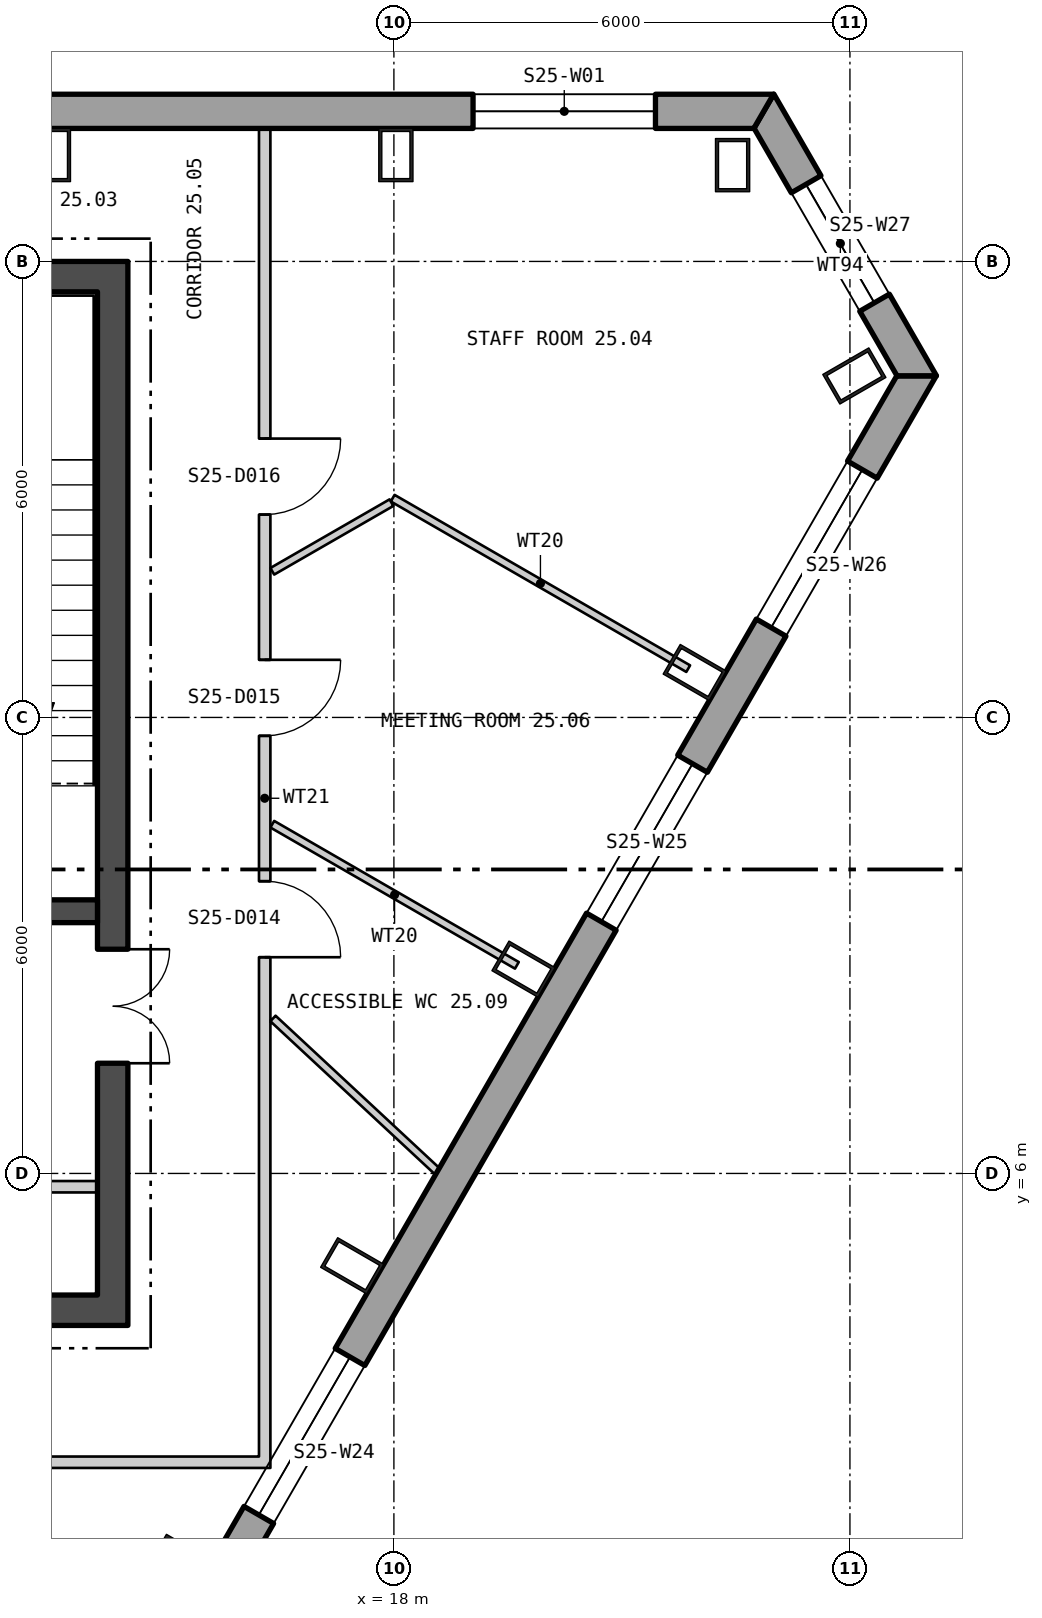
"""IFC4 building model, lengths in metres.
Left out: names, types, materials, properties, quantities, classifications, styles, units other than length and angle.
Written with IfcOpenShell. Run it as: python <this file> out.ifc"""

import sys

from ifc_helpers import new_model, si_unit, direction, frame, frame_2d, origin, origin_2d, place, context, subcontext, project, spatial, polyline, rectangle, hollow_rectangle, outline, extrude, element, fill, save


model = new_model("IFC4")
c1 = context("Model", 3, precision=1e-05, world=origin(), true_north=direction((0.0, 1.0)))
c2 = subcontext(c1, "Body", "Model", "MODEL_VIEW")
j1 = project(units=[si_unit("LENGTHUNIT", "METRE"), si_unit("PLANEANGLEUNIT", "RADIAN")], contexts=[c1])
p1 = place(None, origin())
s1 = spatial("IfcSite", under=j1, at=p1, CompositionType="ELEMENT")
p2 = place(p1, origin())
s2 = spatial("IfcBuilding", under=s1, at=p2, CompositionType="ELEMENT")
p3 = place(p2, frame((0.0, 0.0, 321.0)))
s3 = spatial("IfcBuildingStorey", under=s2, at=p3, CompositionType="ELEMENT", Elevation=321.0)
for number, where, z_axis, x_axis in (
    (1, (22.456, 19.267, 0.0), (0.0, 0.0, 1.0), (-1.0, 0.0, 0.0)),
    (2, (18.026, 19.4, 0.0), (0.0, 0.0, 1.0), (-1.0, 0.0, 0.0)),
    (3, (13.52, 19.4, 0.0), (0.0, 0.0, 1.0), (-1.0, 0.0, 0.0)),
    (4, (15.198, 0.882, 0.0), (0.0, 0.0, 1.0), (0.5, 0.866, 0.0)),
    (5, (17.451, 4.785, 0.0), (0.0, 0.0, 1.0), (0.5, 0.866, 0.0)),
    (6, (19.705, 8.688, 0.0), (0.0, 0.0, 1.0), (0.5, 0.866, 0.0)),
    (7, (21.958, 12.591, 0.0), (0.0, 0.0, 1.0), (0.5, 0.866, 0.0)),
    (8, (24.058, 16.493, 0.0), (0.0, 0.0, 1.0), (-0.5, 0.866, 0.0)),
):
    element("IfcColumn", number, at=place(p3, frame(where, z_axis=z_axis, x_axis=x_axis)), inside=s3, PredefinedType="COLUMN", context=c2, shape_type="SweptSolid", body=[
        extrude(hollow_rectangle(XDim=0.45, YDim=0.7, WallThickness=0.04, at=origin_2d()), origin(), (0.0, 0.0, 1.0), 4.2),
    ])
p4 = place(p3, frame((22.865, 19.975, -0.4), z_axis=(0.0, 0.0, 1.0), x_axis=(-1.0, 0.0, 0.0)))
e9 = element("IfcWall", 9, at=p4, inside=s3, PredefinedType="SOLIDWALL", context=c2, shape_type="SweptSolid", body=[
    extrude(outline(polyline([(-0.13, -0.225), (45.86, -0.225), (45.6, 0.225), (0.13, 0.225), (-0.13, -0.225)])), origin(), (0.0, 0.0, 1.0), 4.2),
])
p5 = place(p4, frame((1.424, 0.0, 1.3)))
e10 = element("IfcOpeningElement", 10, at=p5, cuts=e9, PredefinedType="OPENING", context=c2, shape_type="SweptSolid", body=[
    extrude(rectangle(XDim=2.4, YDim=2.3, at=frame_2d((1.2, 1.15))), frame((0.0, 0.235, 0.0), z_axis=(0.0, -1.0, 0.0), x_axis=(1.0, 0.0, 0.0)), (0.0, 0.0, 1.0), 0.47),
])
p6 = place(p4, frame((14.905, 0.0, 1.3)))
e11 = element("IfcOpeningElement", 11, at=p6, cuts=e9, PredefinedType="OPENING", context=c2, shape_type="SweptSolid", body=[
    extrude(rectangle(XDim=2.4, YDim=2.3, at=frame_2d((1.2, 1.15))), frame((0.0, 0.235, 0.0), z_axis=(0.0, -1.0, 0.0), x_axis=(1.0, 0.0, 0.0)), (0.0, 0.0, 1.0), 0.47),
])
p7 = place(p4, frame((19.412, 0.0, 1.3)))
e12 = element("IfcOpeningElement", 12, at=p7, cuts=e9, PredefinedType="OPENING", context=c2, shape_type="SweptSolid", body=[
    extrude(rectangle(XDim=2.4, YDim=2.3, at=frame_2d((1.2, 1.15))), frame((0.0, 0.235, 0.0), z_axis=(0.0, -1.0, 0.0), x_axis=(1.0, 0.0, 0.0)), (0.0, 0.0, 1.0), 0.47),
])
p8 = place(p4, frame((23.918, 0.0, 1.3)))
e13 = element("IfcOpeningElement", 13, at=p8, cuts=e9, PredefinedType="OPENING", context=c2, shape_type="SweptSolid", body=[
    extrude(rectangle(XDim=2.4, YDim=2.3, at=frame_2d((1.2, 1.15))), frame((0.0, 0.235, 0.0), z_axis=(0.0, -1.0, 0.0), x_axis=(1.0, 0.0, 0.0)), (0.0, 0.0, 1.0), 0.47),
])
p9 = place(p4, frame((28.425, 0.0, 1.3)))
e14 = element("IfcOpeningElement", 14, at=p9, cuts=e9, PredefinedType="OPENING", context=c2, shape_type="SweptSolid", body=[
    extrude(rectangle(XDim=2.4, YDim=2.3, at=frame_2d((1.2, 1.15))), frame((0.0, 0.235, 0.0), z_axis=(0.0, -1.0, 0.0), x_axis=(1.0, 0.0, 0.0)), (0.0, 0.0, 1.0), 0.47),
])
p10 = place(p4, frame((32.932, 0.0, 1.3)))
e15 = element("IfcOpeningElement", 15, at=p10, cuts=e9, PredefinedType="OPENING", context=c2, shape_type="SweptSolid", body=[
    extrude(rectangle(XDim=2.4, YDim=2.3, at=frame_2d((1.2, 1.15))), frame((0.0, 0.235, 0.0), z_axis=(0.0, -1.0, 0.0), x_axis=(1.0, 0.0, 0.0)), (0.0, 0.0, 1.0), 0.47),
])
p11 = place(p4, frame((41.907, 0.0, 1.3)))
e16 = element("IfcOpeningElement", 16, at=p11, cuts=e9, PredefinedType="OPENING", context=c2, shape_type="SweptSolid", body=[
    extrude(rectangle(XDim=2.4, YDim=2.3, at=frame_2d((1.2, 1.15))), frame((0.0, 0.235, 0.0), z_axis=(0.0, -1.0, 0.0), x_axis=(1.0, 0.0, 0.0)), (0.0, 0.0, 1.0), 0.47),
])
p12 = place(p3, frame((2.01, -23.11, -0.18), z_axis=(0.0, 0.0, 1.0), x_axis=(0.500000141277, 0.866025322218, 0.0)))
e17 = element("IfcWall", 17, at=p12, inside=s3, PredefinedType="SOLIDWALL", context=c2, shape_type="SweptSolid", body=[
    extrude(outline(polyline([(-0.13, -0.225), (45.86, -0.225), (45.6, 0.225), (0.13, 0.225), (-0.13, -0.225)])), origin(), (0.0, 0.0, 1.0), 3.98),
])
p13 = place(p12, frame((1.424, 0.0, 1.08)))
e18 = element("IfcOpeningElement", 18, at=p13, cuts=e17, PredefinedType="OPENING", context=c2, shape_type="SweptSolid", body=[
    extrude(rectangle(XDim=2.4, YDim=2.3, at=frame_2d((1.2, 1.15))), frame((0.0, 0.235, 0.0), z_axis=(0.0, -1.0, 0.0), x_axis=(1.0, 0.0, 0.0)), (0.0, 0.0, 1.0), 0.47),
])
p14 = place(p12, frame((5.892, 0.0, 1.08)))
e19 = element("IfcOpeningElement", 19, at=p14, cuts=e17, PredefinedType="OPENING", context=c2, shape_type="SweptSolid", body=[
    extrude(rectangle(XDim=2.4, YDim=2.3, at=frame_2d((1.2, 1.15))), frame((0.0, 0.235, 0.0), z_axis=(0.0, -1.0, 0.0), x_axis=(1.0, 0.0, 0.0)), (0.0, 0.0, 1.0), 0.47),
])
p15 = place(p12, frame((14.905, 0.0, 1.08)))
e20 = element("IfcOpeningElement", 20, at=p15, cuts=e17, PredefinedType="OPENING", context=c2, shape_type="SweptSolid", body=[
    extrude(rectangle(XDim=2.4, YDim=2.3, at=frame_2d((1.2, 1.15))), frame((0.0, 0.235, 0.0), z_axis=(0.0, -1.0, 0.0), x_axis=(1.0, 0.0, 0.0)), (0.0, 0.0, 1.0), 0.47),
])
p16 = place(p12, frame((19.412, 0.0, 1.08)))
e21 = element("IfcOpeningElement", 21, at=p16, cuts=e17, PredefinedType="OPENING", context=c2, shape_type="SweptSolid", body=[
    extrude(rectangle(XDim=2.4, YDim=2.3, at=frame_2d((1.2, 1.15))), frame((0.0, 0.235, 0.0), z_axis=(0.0, -1.0, 0.0), x_axis=(1.0, 0.0, 0.0)), (0.0, 0.0, 1.0), 0.47),
])
p17 = place(p12, frame((23.918, 0.0, 1.08)))
e22 = element("IfcOpeningElement", 22, at=p17, cuts=e17, PredefinedType="OPENING", context=c2, shape_type="SweptSolid", body=[
    extrude(rectangle(XDim=2.4, YDim=2.3, at=frame_2d((1.2, 1.15))), frame((0.0, 0.235, 0.0), z_axis=(0.0, -1.0, 0.0), x_axis=(1.0, 0.0, 0.0)), (0.0, 0.0, 1.0), 0.47),
])
p18 = place(p12, frame((28.425, 0.0, 1.08)))
e23 = element("IfcOpeningElement", 23, at=p18, cuts=e17, PredefinedType="OPENING", context=c2, shape_type="SweptSolid", body=[
    extrude(rectangle(XDim=2.4, YDim=2.3, at=frame_2d((1.2, 1.15))), frame((0.0, 0.235, 0.0), z_axis=(0.0, -1.0, 0.0), x_axis=(1.0, 0.0, 0.0)), (0.0, 0.0, 1.0), 0.47),
])
p19 = place(p12, frame((37.438, 0.0, 1.08)))
e24 = element("IfcOpeningElement", 24, at=p19, cuts=e17, PredefinedType="OPENING", context=c2, shape_type="SweptSolid", body=[
    extrude(rectangle(XDim=2.4, YDim=2.3, at=frame_2d((1.2, 1.15))), frame((0.0, 0.235, 0.0), z_axis=(0.0, -1.0, 0.0), x_axis=(1.0, 0.0, 0.0)), (0.0, 0.0, 1.0), 0.47),
])
p20 = place(p12, frame((41.907, 0.0, 1.08)))
e25 = element("IfcOpeningElement", 25, at=p20, cuts=e17, PredefinedType="OPENING", context=c2, shape_type="SweptSolid", body=[
    extrude(rectangle(XDim=2.4, YDim=2.3, at=frame_2d((1.2, 1.15))), frame((0.0, 0.235, 0.0), z_axis=(0.0, -1.0, 0.0), x_axis=(1.0, 0.0, 0.0)), (0.0, 0.0, 1.0), 0.47),
])
p21 = place(p3, frame((24.879, 16.496, -0.4), z_axis=(0.0, 0.0, 1.0), x_axis=(-0.499999496815, 0.866025694299, 0.0)))
e26 = element("IfcWall", 26, at=p21, inside=s3, PredefinedType="SOLIDWALL", context=c2, shape_type="SweptSolid", body=[
    extrude(outline(polyline([(-0.13, -0.225), (4.15, -0.225), (3.89, 0.225), (0.13, 0.225), (-0.13, -0.225)])), origin(), (0.0, 0.0, 1.0), 4.2),
])
p22 = place(p21, frame((1.11, 0.0, 1.3)))
e27 = element("IfcOpeningElement", 27, at=p22, cuts=e26, PredefinedType="OPENING", context=c2, shape_type="SweptSolid", body=[
    extrude(rectangle(XDim=1.8, YDim=2.3, at=frame_2d((0.9, 1.15))), frame((0.0, 0.235, 0.0), z_axis=(0.0, -1.0, 0.0), x_axis=(1.0, 0.0, 0.0)), (0.0, 0.0, 1.0), 0.47),
])
p23 = place(p3, frame((-14.5, 4.2, 0.0), z_axis=(0.0, 0.0, 1.0), x_axis=(1.0, 0.0, 0.0)))
e28 = element("IfcWall", 28, at=p23, inside=s3, PredefinedType="SHEAR", context=c2, shape_type="SweptSolid", body=[
    extrude(rectangle(XDim=29.0, YDim=0.4, at=frame_2d((14.5, 0.0))), origin(), (0.0, 0.0, 1.0), 4.0),
])
p24 = place(p23, frame((9.0, 0.0, 0.0)))
e29 = element("IfcOpeningElement", 29, at=p24, cuts=e28, PredefinedType="OPENING", context=c2, shape_type="SweptSolid", body=[
    extrude(rectangle(XDim=1.8, YDim=2.4, at=frame_2d((0.9, 1.2))), frame((0.0, 0.21, 0.0), z_axis=(0.0, -1.0, 0.0), x_axis=(1.0, 0.0, 0.0)), (0.0, 0.0, 1.0), 0.42),
])
p25 = place(p23, frame((19.0, 0.0, 0.0)))
e30 = element("IfcOpeningElement", 30, at=p25, cuts=e28, PredefinedType="OPENING", context=c2, shape_type="SweptSolid", body=[
    extrude(rectangle(XDim=1.8, YDim=2.4, at=frame_2d((0.9, 1.2))), frame((0.0, 0.21, 0.0), z_axis=(0.0, -1.0, 0.0), x_axis=(1.0, 0.0, 0.0)), (0.0, 0.0, 1.0), 0.42),
])
p26 = place(p3, frame((-14.5, 17.8, 0.0), z_axis=(0.0, 0.0, 1.0), x_axis=(1.0, 0.0, 0.0)))
e31 = element("IfcWall", 31, at=p26, inside=s3, PredefinedType="SHEAR", context=c2, shape_type="SweptSolid", body=[
    extrude(rectangle(XDim=29.0, YDim=0.4, at=frame_2d((14.5, 0.0))), origin(), (0.0, 0.0, 1.0), 4.0),
])
p27 = place(p3, frame((14.3, 4.4, 0.0), z_axis=(0.0, 0.0, 1.0), x_axis=(0.0, 1.0, 0.0)))
e32 = element("IfcWall", 32, at=p27, inside=s3, PredefinedType="SHEAR", context=c2, shape_type="SweptSolid", body=[
    extrude(rectangle(XDim=13.2, YDim=0.4, at=frame_2d((6.6, 0.0))), origin(), (0.0, 0.0, 1.0), 4.0),
])
p28 = place(p27, frame((3.05, 0.0, 0.0)))
e33 = element("IfcOpeningElement", 33, at=p28, cuts=e32, PredefinedType="OPENING", context=c2, shape_type="SweptSolid", body=[
    extrude(rectangle(XDim=1.5, YDim=2.1, at=frame_2d((0.75, 1.05))), frame((0.0, 0.21, 0.0), z_axis=(0.0, -1.0, 0.0), x_axis=(1.0, 0.0, 0.0)), (0.0, 0.0, 1.0), 0.42),
])
p29 = place(p3, frame((11.0, 9.45, 0.0), z_axis=(0.0, 0.0, 1.0), x_axis=(1.0, 0.0, 0.0)))
e34 = element("IfcWall", 34, at=p29, inside=s3, PredefinedType="SHEAR", context=c2, shape_type="SweptSolid", body=[
    extrude(rectangle(XDim=3.1, YDim=0.3, at=frame_2d((1.55, 0.0))), origin(), (0.0, 0.0, 1.0), 4.0),
])
p30 = place(p29, frame((0.95, 0.0, 0.0)))
e35 = element("IfcOpeningElement", 35, at=p30, cuts=e34, PredefinedType="OPENING", context=c2, shape_type="SweptSolid", body=[
    extrude(rectangle(XDim=1.2, YDim=2.1, at=frame_2d((0.6, 1.05))), frame((0.0, 0.16, 0.0), z_axis=(0.0, -1.0, 0.0), x_axis=(1.0, 0.0, 0.0)), (0.0, 0.0, 1.0), 0.32),
])
p31 = place(p3, frame((11.0, 5.825, 0.0), z_axis=(0.0, 0.0, 1.0), x_axis=(1.0, 0.0, 0.0)))
e36 = element("IfcWall", 36, at=p31, inside=s3, PredefinedType="PARTITIONING", context=c2, shape_type="SweptSolid", body=[
    extrude(rectangle(XDim=3.1, YDim=0.15, at=frame_2d((1.55, 0.0))), origin(), (0.0, 0.0, 1.0), 4.0),
])
p32 = place(p3, frame((7.47, 2.2, 0.0), z_axis=(0.0, 0.0, 1.0), x_axis=(1.0, 0.0, 0.0)))
e37 = element("IfcWall", 37, at=p32, inside=s3, PredefinedType="PARTITIONING", context=c2, shape_type="SweptSolid", body=[
    extrude(rectangle(XDim=8.755, YDim=0.15, at=frame_2d((4.378, 0.0))), origin(), (0.0, 0.0, 1.0), 4.0),
])
p33 = place(p32, frame((2.922, 0.0, 0.0)))
e38 = element("IfcOpeningElement", 38, at=p33, cuts=e37, PredefinedType="OPENING", context=c2, shape_type="SweptSolid", body=[
    extrude(rectangle(XDim=1.0, YDim=2.1, at=frame_2d((0.5, 1.05))), frame((0.0, 0.085, 0.0), z_axis=(0.0, -1.0, 0.0), x_axis=(1.0, 0.0, 0.0)), (0.0, 0.0, 1.0), 0.17),
])
p34 = place(p3, frame((16.3, 2.125, 0.0), z_axis=(0.0, 0.0, 1.0), x_axis=(0.0, 1.0, 0.0)))
e39 = element("IfcWall", 39, at=p34, inside=s3, PredefinedType="PARTITIONING", context=c2, shape_type="SweptSolid", body=[
    extrude(rectangle(XDim=17.623, YDim=0.15, at=frame_2d((8.812, 0.0))), origin(), (0.0, 0.0, 1.0), 4.0),
])
p35 = place(p34, frame((6.72, 0.0, 0.0)))
e40 = element("IfcOpeningElement", 40, at=p35, cuts=e39, PredefinedType="OPENING", context=c2, shape_type="SweptSolid", body=[
    extrude(rectangle(XDim=1.0, YDim=2.1, at=frame_2d((0.5, 1.05))), frame((0.0, 0.085, 0.0), z_axis=(0.0, -1.0, 0.0), x_axis=(1.0, 0.0, 0.0)), (0.0, 0.0, 1.0), 0.17),
])
p36 = place(p34, frame((9.633, 0.0, 0.0)))
e41 = element("IfcOpeningElement", 41, at=p36, cuts=e39, PredefinedType="OPENING", context=c2, shape_type="SweptSolid", body=[
    extrude(rectangle(XDim=1.0, YDim=2.1, at=frame_2d((0.5, 1.05))), frame((0.0, 0.085, 0.0), z_axis=(0.0, -1.0, 0.0), x_axis=(1.0, 0.0, 0.0)), (0.0, 0.0, 1.0), 0.17),
])
p37 = place(p34, frame((12.544, 0.0, 0.0)))
e42 = element("IfcOpeningElement", 42, at=p37, cuts=e39, PredefinedType="OPENING", context=c2, shape_type="SweptSolid", body=[
    extrude(rectangle(XDim=1.0, YDim=2.1, at=frame_2d((0.5, 1.05))), frame((0.0, 0.085, 0.0), z_axis=(0.0, -1.0, 0.0), x_axis=(1.0, 0.0, 0.0)), (0.0, 0.0, 1.0), 0.17),
])
p38 = place(p3, frame((16.4, 13.923, 0.0), z_axis=(0.0, 0.0, 1.0), x_axis=(0.866571760088, 0.499052486836, 0.0)))
e43 = element("IfcWall", 43, at=p38, inside=s3, PredefinedType="PARTITIONING", context=c2, shape_type="SweptSolid", body=[
    extrude(rectangle(XDim=1.809, YDim=0.1, at=frame_2d((0.905, 0.0))), origin(), (0.0, 0.0, 1.0), 4.0),
])
p39 = place(p3, frame((16.4, 10.595, 0.0), z_axis=(0.0, 0.0, 1.0), x_axis=(0.866131810338, -0.499815653138, 0.0)))
e44 = element("IfcWall", 44, at=p39, inside=s3, PredefinedType="PARTITIONING", context=c2, shape_type="SweptSolid", body=[
    extrude(rectangle(XDim=3.715, YDim=0.1, at=frame_2d((1.858, 0.0))), origin(), (0.0, 0.0, 1.0), 4.0),
])
p40 = place(p3, frame((16.409, 8.039, 0.0), z_axis=(0.0, 0.0, 1.0), x_axis=(0.732202441649, -0.68108706084, 0.0)))
e45 = element("IfcWall", 45, at=p40, inside=s3, PredefinedType="PARTITIONING", context=c2, shape_type="SweptSolid", body=[
    extrude(rectangle(XDim=2.954, YDim=0.1, at=frame_2d((1.477, 0.0))), origin(), (0.0, 0.0, 1.0), 4.0),
])
p41 = place(p3, frame((17.984, 14.885, 0.0), z_axis=(0.0, 0.0, 1.0), x_axis=(0.86619300392, -0.499709595626, 0.0)))
e46 = element("IfcWall", 46, at=p41, inside=s3, PredefinedType="PARTITIONING", context=c2, shape_type="SweptSolid", body=[
    extrude(rectangle(XDim=4.489, YDim=0.1, at=frame_2d((2.244, 0.0))), origin(), (0.0, 0.0, 1.0), 4.0),
])
p42 = place(p5, origin())
e47 = element("IfcWindow", 47, at=p42, inside=s3, PartitioningType="SINGLE_PANEL", PredefinedType="WINDOW", context=c2, shape_type="SweptSolid", body=[
    extrude(rectangle(XDim=2.4, YDim=2.3, at=frame_2d((1.2, 1.15))), frame((0.0, 0.105, 0.0), z_axis=(0.0, -1.0, 0.0), x_axis=(1.0, 0.0, 0.0)), (0.0, 0.0, 1.0), 0.06),
])
fill(e10, e47)
p43 = place(p18, origin())
e48 = element("IfcWindow", 48, at=p43, inside=s3, PartitioningType="SINGLE_PANEL", PredefinedType="WINDOW", context=c2, shape_type="SweptSolid", body=[
    extrude(rectangle(XDim=2.4, YDim=2.3, at=frame_2d((1.2, 1.15))), frame((0.0, 0.105, 0.0), z_axis=(0.0, -1.0, 0.0), x_axis=(1.0, 0.0, 0.0)), (0.0, 0.0, 1.0), 0.06),
])
fill(e23, e48)
p44 = place(p19, origin())
e49 = element("IfcWindow", 49, at=p44, inside=s3, PartitioningType="SINGLE_PANEL", PredefinedType="WINDOW", context=c2, shape_type="SweptSolid", body=[
    extrude(rectangle(XDim=2.4, YDim=2.3, at=frame_2d((1.2, 1.15))), frame((0.0, 0.105, 0.0), z_axis=(0.0, -1.0, 0.0), x_axis=(1.0, 0.0, 0.0)), (0.0, 0.0, 1.0), 0.06),
])
fill(e24, e49)
p45 = place(p20, origin())
e50 = element("IfcWindow", 50, at=p45, inside=s3, PartitioningType="SINGLE_PANEL", PredefinedType="WINDOW", context=c2, shape_type="SweptSolid", body=[
    extrude(rectangle(XDim=2.4, YDim=2.3, at=frame_2d((1.2, 1.15))), frame((0.0, 0.105, 0.0), z_axis=(0.0, -1.0, 0.0), x_axis=(1.0, 0.0, 0.0)), (0.0, 0.0, 1.0), 0.06),
])
fill(e25, e50)
p46 = place(p22, origin())
e51 = element("IfcWindow", 51, at=p46, inside=s3, PartitioningType="SINGLE_PANEL", PredefinedType="WINDOW", context=c2, shape_type="SweptSolid", body=[
    extrude(rectangle(XDim=1.8, YDim=2.3, at=frame_2d((0.9, 1.15))), frame((0.0, 0.105, 0.0), z_axis=(0.0, -1.0, 0.0), x_axis=(1.0, 0.0, 0.0)), (0.0, 0.0, 1.0), 0.06),
])
fill(e27, e51)
p47 = place(p28, origin())
e52 = element("IfcDoor", 52, at=p47, inside=s3, OperationType="DOUBLE_DOOR_SINGLE_SWING", PredefinedType="DOOR", context=c2, shape_type="SweptSolid", body=[
    extrude(rectangle(XDim=1.5, YDim=2.1, at=frame_2d((0.75, 1.05))), frame((0.0, 0.025, 0.0), z_axis=(0.0, -1.0, 0.0), x_axis=(1.0, 0.0, 0.0)), (0.0, 0.0, 1.0), 0.05),
])
fill(e33, e52)
p48 = place(p35, origin())
e53 = element("IfcDoor", 53, at=p48, inside=s3, OperationType="SINGLE_SWING_LEFT", PredefinedType="DOOR", context=c2, shape_type="SweptSolid", body=[
    extrude(rectangle(XDim=1.0, YDim=2.1, at=frame_2d((0.5, 1.05))), frame((0.0, 0.025, 0.0), z_axis=(0.0, -1.0, 0.0), x_axis=(1.0, 0.0, 0.0)), (0.0, 0.0, 1.0), 0.05),
])
fill(e40, e53)
p49 = place(p36, origin())
e54 = element("IfcDoor", 54, at=p49, inside=s3, OperationType="SINGLE_SWING_RIGHT", PredefinedType="DOOR", context=c2, shape_type="SweptSolid", body=[
    extrude(rectangle(XDim=1.0, YDim=2.1, at=frame_2d((0.5, 1.05))), frame((0.0, 0.025, 0.0), z_axis=(0.0, -1.0, 0.0), x_axis=(1.0, 0.0, 0.0)), (0.0, 0.0, 1.0), 0.05),
])
fill(e41, e54)
p50 = place(p37, origin())
e55 = element("IfcDoor", 55, at=p50, inside=s3, OperationType="SINGLE_SWING_RIGHT", PredefinedType="DOOR", context=c2, shape_type="SweptSolid", body=[
    extrude(rectangle(XDim=1.0, YDim=2.1, at=frame_2d((0.5, 1.05))), frame((0.0, 0.025, 0.0), z_axis=(0.0, -1.0, 0.0), x_axis=(1.0, 0.0, 0.0)), (0.0, 0.0, 1.0), 0.05),
])
fill(e42, e55)
save(model, sys.argv[1])
